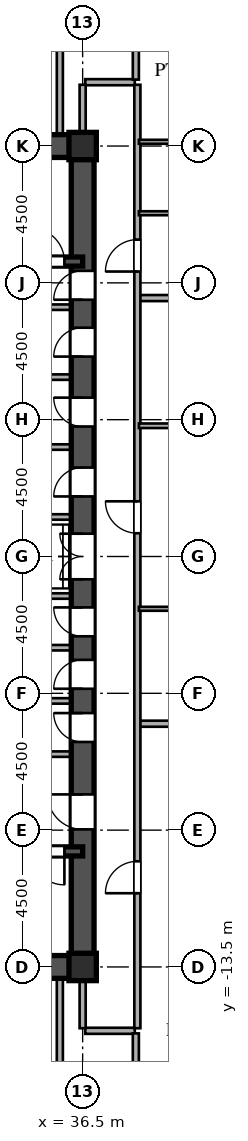
"""IFC4 building model, lengths in metres.
Left out: names, types, materials, properties, quantities, classifications, styles, units other than length and angle.
Written with IfcOpenShell. Run it as: python <this file> out.ifc"""

import sys

from ifc_helpers import new_model, si_unit, direction, frame, frame_2d, origin, origin_2d, place, context, subcontext, project, spatial, rectangle, i_section, extrude, source, transform, mapped, element, fill, save


model = new_model("IFC4")
c1 = context("Model", 3, precision=1e-05, world=origin(), true_north=direction((0.0, 1.0)))
c2 = subcontext(c1, "Body", "Model", "MODEL_VIEW")
j1 = project(units=[si_unit("LENGTHUNIT", "METRE"), si_unit("PLANEANGLEUNIT", "RADIAN")], contexts=[c1])
p1 = place(None, origin())
s1 = spatial("IfcSite", under=j1, at=p1, CompositionType="ELEMENT")
p2 = place(p1, origin())
s2 = spatial("IfcBuilding", under=s1, at=p2, CompositionType="ELEMENT")
p3 = place(p2, frame((0.0, 0.0, 58.5)))
s3 = spatial("IfcBuildingStorey", under=s2, at=p3, CompositionType="ELEMENT", Elevation=58.5)
m1 = source(origin(), c2, "Body", "SweptSolid", [
    extrude(i_section(OverallWidth=0.9, OverallDepth=0.9, WebThickness=0.036, FlangeThickness=0.055, at=origin_2d()), origin(), (0.0, 0.0, 1.0), 3.6),
])
for number, where, z_axis, x_axis in (
    (1, (36.5, -13.5, 0.0), (0.0, 0.0, 1.0), (1.0, 0.0, 0.0)),
    (2, (36.5, 13.5, 0.0), (0.0, 0.0, 1.0), (1.0, 0.0, 0.0)),
):
    element("IfcColumn", number, at=place(p3, frame(where, z_axis=z_axis, x_axis=x_axis)), inside=s3, PredefinedType="COLUMN", context=c2, shape_type="MappedRepresentation", body=[
        mapped(m1, transform((0.0, 0.0, 0.0), scale=1.0)),
    ])
for number, where, z_axis, x_axis in (
    (3, (27.5, -13.5, 0.0), (0.0, 0.0, 1.0), (1.0, 0.0, 0.0)),
    (4, (27.5, 13.5, 0.0), (0.0, 0.0, 1.0), (1.0, 0.0, 0.0)),
):
    element("IfcWall", number, at=place(p3, frame(where, z_axis=z_axis, x_axis=x_axis)), inside=s3, PredefinedType="SHEAR", context=c2, shape_type="SweptSolid", body=[
        extrude(rectangle(XDim=9.0, YDim=0.75, at=frame_2d((4.5, 0.0))), origin(), (0.0, 0.0, 1.0), 3.38),
    ])
p4 = place(p3, frame((36.5, -13.65, 0.0), z_axis=(0.0, 0.0, 1.0), x_axis=(0.0, 1.0, 0.0)))
e5 = element("IfcWall", 5, at=p4, inside=s3, PredefinedType="SHEAR", context=c2, shape_type="SweptSolid", body=[
    extrude(rectangle(XDim=7.15, YDim=0.75, at=frame_2d((3.575, 0.0))), origin(), (0.0, 0.0, 1.0), 3.38),
])
p5 = place(p4, frame((4.675, 0.0, 0.0)))
e6 = element("IfcOpeningElement", 6, at=p5, cuts=e5, PredefinedType="OPENING", context=c2, shape_type="SweptSolid", body=[
    extrude(rectangle(XDim=1.15, YDim=2.2, at=frame_2d((0.575, 1.1))), frame((0.0, 0.385, 0.0), z_axis=(0.0, -1.0, 0.0), x_axis=(1.0, 0.0, 0.0)), (0.0, 0.0, 1.0), 0.77),
])
p6 = place(p3, frame((36.5, -1.3, 0.0), z_axis=(0.0, 0.0, 1.0), x_axis=(0.0, 1.0, 0.0)))
e7 = element("IfcWall", 7, at=p6, inside=s3, PredefinedType="SHEAR", context=c2, shape_type="SweptSolid", body=[
    extrude(rectangle(XDim=2.6, YDim=0.75, at=frame_2d((1.3, 0.0))), origin(), (0.0, 0.0, 1.0), 3.38),
])
p7 = place(p6, frame((0.55, 0.0, 0.0)))
e8 = element("IfcOpeningElement", 8, at=p7, cuts=e7, PredefinedType="OPENING", context=c2, shape_type="SweptSolid", body=[
    extrude(rectangle(XDim=1.5, YDim=2.3, at=frame_2d((0.75, 1.15))), frame((0.0, 0.385, 0.0), z_axis=(0.0, -1.0, 0.0), x_axis=(1.0, 0.0, 0.0)), (0.0, 0.0, 1.0), 0.77),
])
p8 = place(p3, frame((36.5, 8.2, 0.0), z_axis=(0.0, 0.0, 1.0), x_axis=(0.0, 1.0, 0.0)))
e9 = element("IfcWall", 9, at=p8, inside=s3, PredefinedType="SHEAR", context=c2, shape_type="SweptSolid", body=[
    extrude(rectangle(XDim=5.45, YDim=0.75, at=frame_2d((2.725, 0.0))), origin(), (0.0, 0.0, 1.0), 3.38),
])
p9 = place(p8, frame((0.245, 0.0, 0.0)))
e10 = element("IfcOpeningElement", 10, at=p9, cuts=e9, PredefinedType="OPENING", context=c2, shape_type="SweptSolid", body=[
    extrude(rectangle(XDim=0.95, YDim=2.15, at=frame_2d((0.475, 1.075))), frame((0.0, 0.385, 0.0), z_axis=(0.0, -1.0, 0.0), x_axis=(1.0, 0.0, 0.0)), (0.0, 0.0, 1.0), 0.77),
])
p10 = place(p3, frame((36.5, -6.5, 0.0), z_axis=(0.0, 0.0, 1.0), x_axis=(0.0, 1.0, 0.0)))
e11 = element("IfcWall", 11, at=p10, inside=s3, PredefinedType="SHEAR", context=c2, shape_type="SweptSolid", body=[
    extrude(rectangle(XDim=1.75, YDim=0.75, at=frame_2d((0.875, 0.0))), origin(), (0.0, 0.0, 1.0), 3.38),
])
p11 = place(p10, frame((0.4, 0.0, 0.0)))
e12 = element("IfcOpeningElement", 12, at=p11, cuts=e11, PredefinedType="OPENING", context=c2, shape_type="SweptSolid", body=[
    extrude(rectangle(XDim=0.95, YDim=2.15, at=frame_2d((0.475, 1.075))), frame((0.0, 0.385, 0.0), z_axis=(0.0, -1.0, 0.0), x_axis=(1.0, 0.0, 0.0)), (0.0, 0.0, 1.0), 0.77),
])
p12 = place(p3, frame((36.5, -4.75, 0.0), z_axis=(0.0, 0.0, 1.0), x_axis=(0.0, 1.0, 0.0)))
e13 = element("IfcWall", 13, at=p12, inside=s3, PredefinedType="SHEAR", context=c2, shape_type="SweptSolid", body=[
    extrude(rectangle(XDim=1.75, YDim=0.75, at=frame_2d((0.875, 0.0))), origin(), (0.0, 0.0, 1.0), 3.38),
])
p13 = place(p12, frame((0.4, 0.0, 0.0)))
e14 = element("IfcOpeningElement", 14, at=p13, cuts=e13, PredefinedType="OPENING", context=c2, shape_type="SweptSolid", body=[
    extrude(rectangle(XDim=0.95, YDim=2.15, at=frame_2d((0.475, 1.075))), frame((0.0, 0.385, 0.0), z_axis=(0.0, -1.0, 0.0), x_axis=(1.0, 0.0, 0.0)), (0.0, 0.0, 1.0), 0.77),
])
p14 = place(p3, frame((36.5, -3.0, 0.0), z_axis=(0.0, 0.0, 1.0), x_axis=(0.0, 1.0, 0.0)))
e15 = element("IfcWall", 15, at=p14, inside=s3, PredefinedType="SHEAR", context=c2, shape_type="SweptSolid", body=[
    extrude(rectangle(XDim=1.7, YDim=0.75, at=frame_2d((0.85, 0.0))), origin(), (0.0, 0.0, 1.0), 3.38),
])
p15 = place(p14, frame((0.375, 0.0, 0.0)))
e16 = element("IfcOpeningElement", 16, at=p15, cuts=e15, PredefinedType="OPENING", context=c2, shape_type="SweptSolid", body=[
    extrude(rectangle(XDim=0.95, YDim=2.15, at=frame_2d((0.475, 1.075))), frame((0.0, 0.385, 0.0), z_axis=(0.0, -1.0, 0.0), x_axis=(1.0, 0.0, 0.0)), (0.0, 0.0, 1.0), 0.77),
])
p16 = place(p3, frame((36.5, 1.3, 0.0), z_axis=(0.0, 0.0, 1.0), x_axis=(0.0, 1.0, 0.0)))
e17 = element("IfcWall", 17, at=p16, inside=s3, PredefinedType="SHEAR", context=c2, shape_type="SweptSolid", body=[
    extrude(rectangle(XDim=2.3, YDim=0.75, at=frame_2d((1.15, 0.0))), origin(), (0.0, 0.0, 1.0), 3.38),
])
p17 = place(p16, frame((0.675, 0.0, 0.0)))
e18 = element("IfcOpeningElement", 18, at=p17, cuts=e17, PredefinedType="OPENING", context=c2, shape_type="SweptSolid", body=[
    extrude(rectangle(XDim=0.95, YDim=2.15, at=frame_2d((0.475, 1.075))), frame((0.0, 0.385, 0.0), z_axis=(0.0, -1.0, 0.0), x_axis=(1.0, 0.0, 0.0)), (0.0, 0.0, 1.0), 0.77),
])
p18 = place(p3, frame((36.5, 3.6, 0.0), z_axis=(0.0, 0.0, 1.0), x_axis=(0.0, 1.0, 0.0)))
e19 = element("IfcWall", 19, at=p18, inside=s3, PredefinedType="SHEAR", context=c2, shape_type="SweptSolid", body=[
    extrude(rectangle(XDim=2.3, YDim=0.75, at=frame_2d((1.15, 0.0))), origin(), (0.0, 0.0, 1.0), 3.38),
])
p19 = place(p18, frame((0.675, 0.0, 0.0)))
e20 = element("IfcOpeningElement", 20, at=p19, cuts=e19, PredefinedType="OPENING", context=c2, shape_type="SweptSolid", body=[
    extrude(rectangle(XDim=0.95, YDim=2.15, at=frame_2d((0.475, 1.075))), frame((0.0, 0.385, 0.0), z_axis=(0.0, -1.0, 0.0), x_axis=(1.0, 0.0, 0.0)), (0.0, 0.0, 1.0), 0.77),
])
p20 = place(p3, frame((36.5, 5.9, 0.0), z_axis=(0.0, 0.0, 1.0), x_axis=(0.0, 1.0, 0.0)))
e21 = element("IfcWall", 21, at=p20, inside=s3, PredefinedType="SHEAR", context=c2, shape_type="SweptSolid", body=[
    extrude(rectangle(XDim=2.3, YDim=0.75, at=frame_2d((1.15, 0.0))), origin(), (0.0, 0.0, 1.0), 3.38),
])
p21 = place(p20, frame((0.675, 0.0, 0.0)))
e22 = element("IfcOpeningElement", 22, at=p21, cuts=e21, PredefinedType="OPENING", context=c2, shape_type="SweptSolid", body=[
    extrude(rectangle(XDim=0.95, YDim=2.15, at=frame_2d((0.475, 1.075))), frame((0.0, 0.385, 0.0), z_axis=(0.0, -1.0, 0.0), x_axis=(1.0, 0.0, 0.0)), (0.0, 0.0, 1.0), 0.77),
])
p22 = place(p3, frame((27.5, -9.7, 0.0), z_axis=(0.0, 0.0, 1.0), x_axis=(1.0, 0.0, 0.0)))
e23 = element("IfcWall", 23, at=p22, inside=s3, PredefinedType="SHEAR", context=c2, shape_type="SweptSolid", body=[
    extrude(rectangle(XDim=9.0, YDim=0.3, at=frame_2d((4.5, 0.0))), origin(), (0.0, 0.0, 1.0), 3.38),
])
p23 = place(p22, frame((7.3, 0.0, 0.0)))
e24 = element("IfcOpeningElement", 24, at=p23, cuts=e23, PredefinedType="OPENING", context=c2, shape_type="SweptSolid", body=[
    extrude(rectangle(XDim=1.1, YDim=2.2, at=frame_2d((0.55, 1.1))), frame((0.0, 0.16, 0.0), z_axis=(0.0, -1.0, 0.0), x_axis=(1.0, 0.0, 0.0)), (0.0, 0.0, 1.0), 0.32),
])
p24 = place(p3, frame((27.5, 9.7, 0.0), z_axis=(0.0, 0.0, 1.0), x_axis=(1.0, 0.0, 0.0)))
e25 = element("IfcWall", 25, at=p24, inside=s3, PredefinedType="SHEAR", context=c2, shape_type="SweptSolid", body=[
    extrude(rectangle(XDim=9.0, YDim=0.3, at=frame_2d((4.5, 0.0))), origin(), (0.0, 0.0, 1.0), 3.38),
])
p25 = place(p24, frame((7.3, 0.0, 0.0)))
e26 = element("IfcOpeningElement", 26, at=p25, cuts=e25, PredefinedType="OPENING", context=c2, shape_type="SweptSolid", body=[
    extrude(rectangle(XDim=1.1, YDim=2.2, at=frame_2d((0.55, 1.1))), frame((0.0, 0.16, 0.0), z_axis=(0.0, -1.0, 0.0), x_axis=(1.0, 0.0, 0.0)), (0.0, 0.0, 1.0), 0.32),
])
for number, where, z_axis, x_axis in (
    (27, (30.45, -6.5, 0.0), (0.0, 0.0, 1.0), (1.0, 0.0, 0.0)),
    (28, (30.45, 8.2, 0.0), (0.0, 0.0, 1.0), (1.0, 0.0, 0.0)),
):
    element("IfcWall", number, at=place(p3, frame(where, z_axis=z_axis, x_axis=x_axis)), inside=s3, PredefinedType="PARTITIONING", context=c2, shape_type="SweptSolid", body=[
        extrude(rectangle(XDim=5.7, YDim=0.18, at=frame_2d((2.85, 0.0))), origin(), (0.0, 0.0, 1.0), 3.38),
    ])
for number, where, z_axis, x_axis in (
    (29, (33.2, -1.3, 0.0), (0.0, 0.0, 1.0), (1.0, 0.0, 0.0)),
    (30, (33.2, 1.3, 0.0), (0.0, 0.0, 1.0), (1.0, 0.0, 0.0)),
    (31, (33.2, -4.75, 0.0), (0.0, 0.0, 1.0), (1.0, 0.0, 0.0)),
    (32, (33.2, -3.0, 0.0), (0.0, 0.0, 1.0), (1.0, 0.0, 0.0)),
    (33, (33.2, 3.6, 0.0), (0.0, 0.0, 1.0), (1.0, 0.0, 0.0)),
    (34, (33.2, 5.9, 0.0), (0.0, 0.0, 1.0), (1.0, 0.0, 0.0)),
):
    element("IfcWall", number, at=place(p3, frame(where, z_axis=z_axis, x_axis=x_axis)), inside=s3, PredefinedType="PARTITIONING", context=c2, shape_type="SweptSolid", body=[
        extrude(rectangle(XDim=2.95, YDim=0.18, at=frame_2d((1.475, 0.0))), origin(), (0.0, 0.0, 1.0), 3.38),
    ])
p26 = place(p3, frame((36.585, -15.6, 0.0), z_axis=(0.0, 0.0, 1.0), x_axis=(1.0, 0.0, 0.0)))
e35 = element("IfcWall", 35, at=p26, inside=s3, PredefinedType="PARTITIONING", context=c2, shape_type="SweptSolid", body=[
    extrude(rectangle(XDim=1.63, YDim=0.2, at=frame_2d((0.815, 0.0))), origin(), (0.0, 0.0, 1.0), 3.38),
])
p27 = place(p3, frame((38.38, -5.5, 0.0), z_axis=(0.0, 0.0, 1.0), x_axis=(1.0, 0.0, 0.0)))
e36 = element("IfcWall", 36, at=p27, inside=s3, PredefinedType="PARTITIONING", context=c2, shape_type="SweptSolid", body=[
    extrude(rectangle(XDim=34.125, YDim=0.2, at=frame_2d((17.062, 0.0))), origin(), (0.0, 0.0, 1.0), 3.38),
])
p28 = place(p3, frame((38.35, -1.72, 0.0), z_axis=(0.0, 0.0, 1.0), x_axis=(1.0, 0.0, 0.0)))
e37 = element("IfcWall", 37, at=p28, inside=s3, PredefinedType="PARTITIONING", context=c2, shape_type="SweptSolid", body=[
    extrude(rectangle(XDim=6.05, YDim=0.13, at=frame_2d((3.025, 0.0))), origin(), (0.0, 0.0, 1.0), 3.38),
])
p29 = place(p28, frame((2.585, 0.0, 0.0)))
e38 = element("IfcOpeningElement", 38, at=p29, cuts=e37, PredefinedType="OPENING", context=c2, shape_type="SweptSolid", body=[
    extrude(rectangle(XDim=0.88, YDim=2.1, at=frame_2d((0.44, 1.05))), frame((0.0, 0.075, 0.0), z_axis=(0.0, -1.0, 0.0), x_axis=(1.0, 0.0, 0.0)), (0.0, 0.0, 1.0), 0.15),
])
p30 = place(p3, frame((38.35, 4.3, 0.0), z_axis=(0.0, 0.0, 1.0), x_axis=(1.0, 0.0, 0.0)))
e39 = element("IfcWall", 39, at=p30, inside=s3, PredefinedType="PARTITIONING", context=c2, shape_type="SweptSolid", body=[
    extrude(rectangle(XDim=6.05, YDim=0.15, at=frame_2d((3.025, 0.0))), origin(), (0.0, 0.0, 1.0), 3.38),
])
p31 = place(p30, frame((2.55, 0.0, 0.0)))
e40 = element("IfcOpeningElement", 40, at=p31, cuts=e39, PredefinedType="OPENING", context=c2, shape_type="SweptSolid", body=[
    extrude(rectangle(XDim=0.95, YDim=2.15, at=frame_2d((0.475, 1.075))), frame((0.0, 0.085, 0.0), z_axis=(0.0, -1.0, 0.0), x_axis=(1.0, 0.0, 0.0)), (0.0, 0.0, 1.0), 0.17),
])
p32 = place(p3, frame((38.38, 8.5, 0.0), z_axis=(0.0, 0.0, 1.0), x_axis=(1.0, 0.0, 0.0)))
e41 = element("IfcWall", 41, at=p32, inside=s3, PredefinedType="PARTITIONING", context=c2, shape_type="SweptSolid", body=[
    extrude(rectangle(XDim=34.125, YDim=0.2, at=frame_2d((17.062, 0.0))), origin(), (0.0, 0.0, 1.0), 3.38),
])
p33 = place(p3, frame((38.35, 11.29, 0.0), z_axis=(0.0, 0.0, 1.0), x_axis=(1.0, 0.0, 0.0)))
e42 = element("IfcWall", 42, at=p33, inside=s3, PredefinedType="PARTITIONING", context=c2, shape_type="SweptSolid", body=[
    extrude(rectangle(XDim=6.05, YDim=0.13, at=frame_2d((3.025, 0.0))), origin(), (0.0, 0.0, 1.0), 3.38),
])
p34 = place(p33, frame((2.585, 0.0, 0.0)))
e43 = element("IfcOpeningElement", 43, at=p34, cuts=e42, PredefinedType="OPENING", context=c2, shape_type="SweptSolid", body=[
    extrude(rectangle(XDim=0.88, YDim=2.1, at=frame_2d((0.44, 1.05))), frame((0.0, 0.075, 0.0), z_axis=(0.0, -1.0, 0.0), x_axis=(1.0, 0.0, 0.0)), (0.0, 0.0, 1.0), 0.15),
])
p35 = place(p3, frame((38.35, 13.64, 0.0), z_axis=(0.0, 0.0, 1.0), x_axis=(1.0, 0.0, 0.0)))
e44 = element("IfcWall", 44, at=p35, inside=s3, PredefinedType="PARTITIONING", context=c2, shape_type="SweptSolid", body=[
    extrude(rectangle(XDim=6.05, YDim=0.13, at=frame_2d((3.025, 0.0))), origin(), (0.0, 0.0, 1.0), 2.68),
])
p36 = place(p3, frame((36.585, 15.6, 0.0), z_axis=(0.0, 0.0, 1.0), x_axis=(1.0, 0.0, 0.0)))
e45 = element("IfcWall", 45, at=p36, inside=s3, PredefinedType="PARTITIONING", context=c2, shape_type="SweptSolid", body=[
    extrude(rectangle(XDim=1.63, YDim=0.2, at=frame_2d((0.815, 0.0))), origin(), (0.0, 0.0, 1.0), 3.38),
])
for number, where, z_axis, x_axis in (
    (46, (35.75, -18.515, 0.0), (0.0, 0.0, 1.0), (0.0, 1.0, 0.0)),
    (47, (35.75, 13.88, 0.0), (0.0, 0.0, 1.0), (0.0, 1.0, 0.0)),
):
    element("IfcWall", number, at=place(p3, frame(where, z_axis=z_axis, x_axis=x_axis)), inside=s3, PredefinedType="PARTITIONING", context=c2, shape_type="SweptSolid", body=[
        extrude(rectangle(XDim=4.635, YDim=0.2, at=frame_2d((2.317, 0.0))), origin(), (0.0, 0.0, 1.0), 3.38),
    ])
for number, where, z_axis, x_axis in (
    (48, (36.5, -15.515, 0.0), (0.0, 0.0, 1.0), (0.0, 1.0, 0.0)),
    (49, (36.5, 13.88, 0.0), (0.0, 0.0, 1.0), (0.0, 1.0, 0.0)),
):
    element("IfcWall", number, at=place(p3, frame(where, z_axis=z_axis, x_axis=x_axis)), inside=s3, PredefinedType="PARTITIONING", context=c2, shape_type="SweptSolid", body=[
        extrude(rectangle(XDim=1.635, YDim=0.2, at=frame_2d((0.817, 0.0))), origin(), (0.0, 0.0, 1.0), 1.38),
    ])
for number, where, z_axis, x_axis in (
    (50, (38.25, -18.515, 0.0), (0.0, 0.0, 1.0), (0.0, 1.0, 0.0)),
    (51, (38.25, 15.685, 0.0), (0.0, 0.0, 1.0), (0.0, 1.0, 0.0)),
):
    element("IfcWall", number, at=place(p3, frame(where, z_axis=z_axis, x_axis=x_axis)), inside=s3, PredefinedType="PARTITIONING", context=c2, shape_type="SweptSolid", body=[
        extrude(rectangle(XDim=2.83, YDim=0.2, at=frame_2d((1.415, 0.0))), origin(), (0.0, 0.0, 1.0), 3.38),
    ])
p37 = place(p3, frame((38.3, -15.515, 0.0), z_axis=(0.0, 0.0, 1.0), x_axis=(0.0, 1.0, 0.0)))
e52 = element("IfcWall", 52, at=p37, inside=s3, PredefinedType="PARTITIONING", context=c2, shape_type="SweptSolid", body=[
    extrude(rectangle(XDim=31.03, YDim=0.2, at=frame_2d((15.515, 0.0))), origin(), (0.0, 0.0, 1.0), 3.38),
])
p38 = place(p37, frame((4.44, 0.0, 0.0)))
e53 = element("IfcOpeningElement", 53, at=p38, cuts=e52, PredefinedType="OPENING", context=c2, shape_type="SweptSolid", body=[
    extrude(rectangle(XDim=1.05, YDim=2.25, at=frame_2d((0.525, 1.125))), frame((0.0, 0.11, 0.0), z_axis=(0.0, -1.0, 0.0), x_axis=(1.0, 0.0, 0.0)), (0.0, 0.0, 1.0), 0.22),
])
p39 = place(p37, frame((16.28, 0.0, 0.0)))
e54 = element("IfcOpeningElement", 54, at=p39, cuts=e52, PredefinedType="OPENING", context=c2, shape_type="SweptSolid", body=[
    extrude(rectangle(XDim=1.05, YDim=2.25, at=frame_2d((0.525, 1.125))), frame((0.0, 0.11, 0.0), z_axis=(0.0, -1.0, 0.0), x_axis=(1.0, 0.0, 0.0)), (0.0, 0.0, 1.0), 0.22),
])
p40 = place(p37, frame((24.887, 0.0, 0.0)))
e55 = element("IfcOpeningElement", 55, at=p40, cuts=e52, PredefinedType="OPENING", context=c2, shape_type="SweptSolid", body=[
    extrude(rectangle(XDim=1.05, YDim=2.25, at=frame_2d((0.525, 1.125))), frame((0.0, 0.11, 0.0), z_axis=(0.0, -1.0, 0.0), x_axis=(1.0, 0.0, 0.0)), (0.0, 0.0, 1.0), 0.22),
])
m2 = source(origin(), c2, "Body", "SweptSolid", [
    extrude(rectangle(XDim=1.15, YDim=2.2, at=frame_2d((0.575, 1.1))), frame((0.0, 0.025, 0.0), z_axis=(0.0, -1.0, 0.0), x_axis=(1.0, 0.0, 0.0)), (0.0, 0.0, 1.0), 0.05),
])
p41 = place(p5, origin())
e56 = element("IfcDoor", 56, at=p41, inside=s3, OperationType="SINGLE_SWING_RIGHT", PredefinedType="DOOR", context=c2, shape_type="MappedRepresentation", body=[
    mapped(m2, transform((0.0, 0.0, 0.0), scale=1.0)),
])
fill(e6, e56)
m3 = source(origin(), c2, "Body", "SweptSolid", [
    extrude(rectangle(XDim=1.5, YDim=2.3, at=frame_2d((0.75, 1.15))), frame((0.0, 0.025, 0.0), z_axis=(0.0, -1.0, 0.0), x_axis=(1.0, 0.0, 0.0)), (0.0, 0.0, 1.0), 0.05),
])
p42 = place(p7, origin())
e57 = element("IfcDoor", 57, at=p42, inside=s3, OperationType="DOUBLE_SWING_LEFT", PredefinedType="DOOR", context=c2, shape_type="MappedRepresentation", body=[
    mapped(m3, transform((0.0, 0.0, 0.0), scale=1.0)),
])
fill(e8, e57)
m4 = source(origin(), c2, "Body", "SweptSolid", [
    extrude(rectangle(XDim=0.95, YDim=2.15, at=frame_2d((0.475, 1.075))), frame((0.0, 0.025, 0.0), z_axis=(0.0, -1.0, 0.0), x_axis=(1.0, 0.0, 0.0)), (0.0, 0.0, 1.0), 0.05),
])
p43 = place(p9, origin())
e58 = element("IfcDoor", 58, at=p43, inside=s3, OperationType="SINGLE_SWING_LEFT", PredefinedType="DOOR", context=c2, shape_type="MappedRepresentation", body=[
    mapped(m4, transform((0.0, 0.0, 0.0), scale=1.0)),
])
fill(e10, e58)
p44 = place(p11, origin())
e59 = element("IfcDoor", 59, at=p44, inside=s3, OperationType="SINGLE_SWING_RIGHT", PredefinedType="DOOR", context=c2, shape_type="MappedRepresentation", body=[
    mapped(m4, transform((0.0, 0.0, 0.0), scale=1.0)),
])
fill(e12, e59)
p45 = place(p13, origin())
e60 = element("IfcDoor", 60, at=p45, inside=s3, OperationType="SINGLE_SWING_LEFT", PredefinedType="DOOR", context=c2, shape_type="MappedRepresentation", body=[
    mapped(m4, transform((0.0, 0.0, 0.0), scale=1.0)),
])
fill(e14, e60)
p46 = place(p15, origin())
e61 = element("IfcDoor", 61, at=p46, inside=s3, OperationType="SINGLE_SWING_RIGHT", PredefinedType="DOOR", context=c2, shape_type="MappedRepresentation", body=[
    mapped(m4, transform((0.0, 0.0, 0.0), scale=1.0)),
])
fill(e16, e61)
p47 = place(p17, origin())
e62 = element("IfcDoor", 62, at=p47, inside=s3, OperationType="SINGLE_SWING_LEFT", PredefinedType="DOOR", context=c2, shape_type="MappedRepresentation", body=[
    mapped(m4, transform((0.0, 0.0, 0.0), scale=1.0)),
])
fill(e18, e62)
p48 = place(p19, origin())
e63 = element("IfcDoor", 63, at=p48, inside=s3, OperationType="SINGLE_SWING_RIGHT", PredefinedType="DOOR", context=c2, shape_type="MappedRepresentation", body=[
    mapped(m4, transform((0.0, 0.0, 0.0), scale=1.0)),
])
fill(e20, e63)
p49 = place(p21, origin())
e64 = element("IfcDoor", 64, at=p49, inside=s3, OperationType="SINGLE_SWING_LEFT", PredefinedType="DOOR", context=c2, shape_type="MappedRepresentation", body=[
    mapped(m4, transform((0.0, 0.0, 0.0), scale=1.0)),
])
fill(e22, e64)
m5 = source(origin(), c2, "Body", "SweptSolid", [
    extrude(rectangle(XDim=1.1, YDim=2.2, at=frame_2d((0.55, 1.1))), frame((0.0, 0.025, 0.0), z_axis=(0.0, -1.0, 0.0), x_axis=(1.0, 0.0, 0.0)), (0.0, 0.0, 1.0), 0.05),
])
p50 = place(p23, frame((1.1, 0.0, 0.0), z_axis=(0.0, 0.0, 1.0), x_axis=(-1.0, 0.0, 0.0)))
e65 = element("IfcDoor", 65, at=p50, inside=s3, OperationType="SINGLE_SWING_RIGHT", PredefinedType="DOOR", context=c2, shape_type="MappedRepresentation", body=[
    mapped(m5, transform((0.0, 0.0, 0.0), scale=1.0)),
])
fill(e24, e65)
p51 = place(p25, origin())
e66 = element("IfcDoor", 66, at=p51, inside=s3, OperationType="SINGLE_SWING_LEFT", PredefinedType="DOOR", context=c2, shape_type="MappedRepresentation", body=[
    mapped(m5, transform((0.0, 0.0, 0.0), scale=1.0)),
])
fill(e26, e66)
m6 = source(origin(), c2, "Body", "SweptSolid", [
    extrude(rectangle(XDim=1.05, YDim=2.25, at=frame_2d((0.525, 1.125))), frame((0.0, 0.025, 0.0), z_axis=(0.0, -1.0, 0.0), x_axis=(1.0, 0.0, 0.0)), (0.0, 0.0, 1.0), 0.05),
])
p52 = place(p38, origin())
e67 = element("IfcDoor", 67, at=p52, inside=s3, OperationType="SINGLE_SWING_LEFT", PredefinedType="DOOR", context=c2, shape_type="MappedRepresentation", body=[
    mapped(m6, transform((0.0, 0.0, 0.0), scale=1.0)),
])
fill(e53, e67)
p53 = place(p39, origin())
e68 = element("IfcDoor", 68, at=p53, inside=s3, OperationType="SINGLE_SWING_RIGHT", PredefinedType="DOOR", context=c2, shape_type="MappedRepresentation", body=[
    mapped(m6, transform((0.0, 0.0, 0.0), scale=1.0)),
])
fill(e54, e68)
p54 = place(p40, origin())
e69 = element("IfcDoor", 69, at=p54, inside=s3, OperationType="SINGLE_SWING_LEFT", PredefinedType="DOOR", context=c2, shape_type="MappedRepresentation", body=[
    mapped(m6, transform((0.0, 0.0, 0.0), scale=1.0)),
])
fill(e55, e69)
save(model, sys.argv[1])
